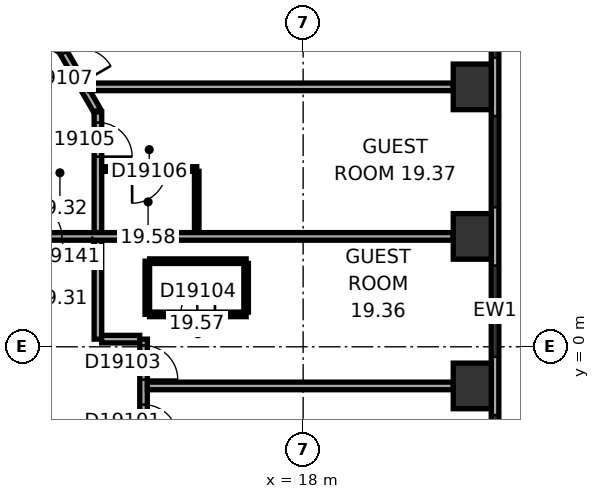
"""IFC4 building model, lengths in metres.
Left out: names, types, materials, properties, quantities, classifications, styles, units other than length and angle.
Written with IfcOpenShell. Run it as: python <this file> out.ifc"""

import sys

from ifc_helpers import new_model, si_unit, direction, frame, frame_2d, origin, origin_2d, place, context, subcontext, project, spatial, rectangle, extrude, element, fill, save


model = new_model("IFC4")
c1 = context("Model", 3, precision=1e-05, world=origin(), true_north=direction((0.0, 1.0)))
c2 = subcontext(c1, "Body", "Model", "MODEL_VIEW")
j1 = project(units=[si_unit("LENGTHUNIT", "METRE"), si_unit("PLANEANGLEUNIT", "RADIAN")], contexts=[c1])
p1 = place(None, origin())
s1 = spatial("IfcSite", under=j1, at=p1, CompositionType="ELEMENT")
p2 = place(p1, origin())
s2 = spatial("IfcBuilding", under=s1, at=p2, CompositionType="ELEMENT")
p3 = place(p2, frame((0.0, 0.0, 86.9)))
s3 = spatial("IfcBuildingStorey", under=s2, at=p3, CompositionType="ELEMENT", Elevation=86.9)
for number, where, z_axis, x_axis in (
    (1, (22.45, -1.03, 0.0), (0.0, 0.0, 1.0), (0.0, 1.0, 0.0)),
    (2, (22.45, 2.905, 0.0), (0.0, 0.0, 1.0), (0.0, 1.0, 0.0)),
    (3, (22.45, 6.839, 0.0), (0.0, 0.0, 1.0), (0.0, 1.0, 0.0)),
):
    element("IfcColumn", number, at=place(p3, frame(where, z_axis=z_axis, x_axis=x_axis)), inside=s3, PredefinedType="COLUMN", context=c2, shape_type="SweptSolid", body=[
        extrude(rectangle(XDim=1.2, YDim=1.0, at=origin_2d()), origin(), (0.0, 0.0, 1.0), 3.3),
    ])
p4 = place(p3, frame((23.05, -9.687, 0.0), z_axis=(0.0, 0.0, 1.0), x_axis=(0.0, 1.0, 0.0)))
e4 = element("IfcWall", 4, at=p4, inside=s3, PredefinedType="STANDARD", context=c2, shape_type="SweptSolid", body=[
    extrude(rectangle(XDim=21.246, YDim=0.2, at=frame_2d((10.623, 0.0))), origin(), (0.0, 0.0, 1.0), 3.3),
])
p5 = place(p4, frame((1.555, 0.0, 0.8)))
e5 = element("IfcOpeningElement", 5, at=p5, cuts=e4, PredefinedType="OPENING", context=c2, shape_type="SweptSolid", body=[
    extrude(rectangle(XDim=2.4, YDim=1.7, at=frame_2d((1.2, 0.85))), frame((0.0, 0.11, 0.0), z_axis=(0.0, -1.0, 0.0), x_axis=(1.0, 0.0, 0.0)), (0.0, 0.0, 1.0), 0.22),
])
p6 = place(p4, frame((5.489, 0.0, 0.8)))
e6 = element("IfcOpeningElement", 6, at=p6, cuts=e4, PredefinedType="OPENING", context=c2, shape_type="SweptSolid", body=[
    extrude(rectangle(XDim=2.4, YDim=1.7, at=frame_2d((1.2, 0.85))), frame((0.0, 0.11, 0.0), z_axis=(0.0, -1.0, 0.0), x_axis=(1.0, 0.0, 0.0)), (0.0, 0.0, 1.0), 0.22),
])
p7 = place(p4, frame((9.424, 0.0, 0.8)))
e7 = element("IfcOpeningElement", 7, at=p7, cuts=e4, PredefinedType="OPENING", context=c2, shape_type="SweptSolid", body=[
    extrude(rectangle(XDim=2.4, YDim=1.7, at=frame_2d((1.2, 0.85))), frame((0.0, 0.11, 0.0), z_axis=(0.0, -1.0, 0.0), x_axis=(1.0, 0.0, 0.0)), (0.0, 0.0, 1.0), 0.22),
])
p8 = place(p4, frame((13.358, 0.0, 0.8)))
e8 = element("IfcOpeningElement", 8, at=p8, cuts=e4, PredefinedType="OPENING", context=c2, shape_type="SweptSolid", body=[
    extrude(rectangle(XDim=2.4, YDim=1.7, at=frame_2d((1.2, 0.85))), frame((0.0, 0.11, 0.0), z_axis=(0.0, -1.0, 0.0), x_axis=(1.0, 0.0, 0.0)), (0.0, 0.0, 1.0), 0.22),
])
p9 = place(p4, frame((17.293, 0.0, 0.8)))
e9 = element("IfcOpeningElement", 9, at=p9, cuts=e4, PredefinedType="OPENING", context=c2, shape_type="SweptSolid", body=[
    extrude(rectangle(XDim=2.4, YDim=1.7, at=frame_2d((1.2, 0.85))), frame((0.0, 0.11, 0.0), z_axis=(0.0, -1.0, 0.0), x_axis=(1.0, 0.0, 0.0)), (0.0, 0.0, 1.0), 0.22),
])
p10 = place(p3, frame((12.58, 6.212, 0.0), z_axis=(0.0, 0.0, 1.0), x_axis=(-0.500063286585, 0.865988862174, 0.0)))
e10 = element("IfcWall", 10, at=p10, inside=s3, PredefinedType="PARTITIONING", context=c2, shape_type="SweptSolid", body=[
    extrude(rectangle(XDim=1.86, YDim=0.2, at=frame_2d((0.93, 0.0))), origin(), (0.0, 0.0, 1.0), 3.05),
])
p11 = place(p10, frame((0.842, 0.0, 0.0)))
e11 = element("IfcOpeningElement", 11, at=p11, cuts=e10, PredefinedType="OPENING", context=c2, shape_type="SweptSolid", body=[
    extrude(rectangle(XDim=0.9, YDim=2.1, at=frame_2d((0.45, 1.05))), frame((0.0, 0.11, 0.0), z_axis=(0.0, -1.0, 0.0), x_axis=(1.0, 0.0, 0.0)), (0.0, 0.0, 1.0), 0.22),
])
p12 = place(p3, frame((12.6, 0.201, 0.0), z_axis=(0.0, 0.0, 1.0), x_axis=(0.0, 1.0, 0.0)))
e12 = element("IfcWall", 12, at=p12, inside=s3, PredefinedType="PARTITIONING", context=c2, shape_type="SweptSolid", body=[
    extrude(rectangle(XDim=2.604, YDim=0.2, at=frame_2d((1.302, 0.0))), origin(), (0.0, 0.0, 1.0), 3.05),
])
p13 = place(p3, frame((12.6, 3.004, 0.0), z_axis=(0.0, 0.0, 1.0), x_axis=(0.0, 1.0, 0.0)))
e13 = element("IfcWall", 13, at=p13, inside=s3, PredefinedType="PARTITIONING", context=c2, shape_type="SweptSolid", body=[
    extrude(rectangle(XDim=3.173, YDim=0.2, at=frame_2d((1.586, 0.0))), origin(), (0.0, 0.0, 1.0), 3.05),
])
p14 = place(p13, frame((1.998, 0.0, 0.0)))
e14 = element("IfcOpeningElement", 14, at=p14, cuts=e13, PredefinedType="OPENING", context=c2, shape_type="SweptSolid", body=[
    extrude(rectangle(XDim=0.9, YDim=2.1, at=frame_2d((0.45, 1.05))), frame((0.0, 0.11, 0.0), z_axis=(0.0, -1.0, 0.0), x_axis=(1.0, 0.0, 0.0)), (0.0, 0.0, 1.0), 0.22),
])
p15 = place(p3, frame((12.7, 4.677, 0.0), z_axis=(0.0, 0.0, 1.0), x_axis=(1.0, 0.0, 0.0)))
e15 = element("IfcWall", 15, at=p15, inside=s3, PredefinedType="PARTITIONING", context=c2, shape_type="SweptSolid", body=[
    extrude(rectangle(XDim=2.5, YDim=0.12, at=frame_2d((1.25, 0.0))), origin(), (0.0, 0.0, 1.0), 3.05),
])
p16 = place(p15, frame((0.8, 0.0, 0.0)))
e16 = element("IfcOpeningElement", 16, at=p16, cuts=e15, PredefinedType="OPENING", context=c2, shape_type="SweptSolid", body=[
    extrude(rectangle(XDim=0.9, YDim=2.1, at=frame_2d((0.45, 1.05))), frame((0.0, 0.07, 0.0), z_axis=(0.0, -1.0, 0.0), x_axis=(1.0, 0.0, 0.0)), (0.0, 0.0, 1.0), 0.14),
])
p17 = place(p3, frame((13.701, 0.201, 0.0), z_axis=(0.0, 0.0, 1.0), x_axis=(-1.0, 0.0, 0.0)))
e17 = element("IfcWall", 17, at=p17, inside=s3, PredefinedType="PARTITIONING", context=c2, shape_type="SweptSolid", body=[
    extrude(rectangle(XDim=1.001, YDim=0.2, at=frame_2d((0.5, 0.0))), origin(), (0.0, 0.0, 1.0), 3.05),
])
p18 = place(p3, frame((13.801, -5.501, 0.0), z_axis=(0.0, 0.0, 1.0), x_axis=(0.0, 1.0, 0.0)))
e18 = element("IfcWall", 18, at=p18, inside=s3, PredefinedType="PARTITIONING", context=c2, shape_type="SweptSolid", body=[
    extrude(rectangle(XDim=5.702, YDim=0.2, at=frame_2d((2.851, 0.0))), origin(), (0.0, 0.0, 1.0), 3.05),
])
p19 = place(p18, frame((3.079, 0.0, 0.0)))
e19 = element("IfcOpeningElement", 19, at=p19, cuts=e18, PredefinedType="OPENING", context=c2, shape_type="SweptSolid", body=[
    extrude(rectangle(XDim=0.9, YDim=2.1, at=frame_2d((0.45, 1.05))), frame((0.0, 0.11, 0.0), z_axis=(0.0, -1.0, 0.0), x_axis=(1.0, 0.0, 0.0)), (0.0, 0.0, 1.0), 0.22),
])
p20 = place(p18, frame((4.636, 0.0, 0.0)))
e20 = element("IfcOpeningElement", 20, at=p20, cuts=e18, PredefinedType="OPENING", context=c2, shape_type="SweptSolid", body=[
    extrude(rectangle(XDim=0.9, YDim=2.1, at=frame_2d((0.45, 1.05))), frame((0.0, 0.11, 0.0), z_axis=(0.0, -1.0, 0.0), x_axis=(1.0, 0.0, 0.0)), (0.0, 0.0, 1.0), 0.22),
])
p21 = place(p3, frame((13.9, 0.853, 0.0), z_axis=(0.0, 0.0, 1.0), x_axis=(0.0, 1.0, 0.0)))
e21 = element("IfcWall", 21, at=p21, inside=s3, PredefinedType="PARTITIONING", context=c2, shape_type="SweptSolid", body=[
    extrude(rectangle(XDim=1.4, YDim=0.12, at=frame_2d((0.7, 0.0))), origin(), (0.0, 0.0, 1.0), 3.05),
])
p22 = place(p3, frame((13.96, 2.253, 0.0), z_axis=(0.0, 0.0, 1.0), x_axis=(1.0, 0.0, 0.0)))
e22 = element("IfcWall", 22, at=p22, inside=s3, PredefinedType="PARTITIONING", context=c2, shape_type="SweptSolid", body=[
    extrude(rectangle(XDim=2.54, YDim=0.12, at=frame_2d((1.27, 0.0))), origin(), (0.0, 0.0, 1.0), 3.05),
])
p23 = place(p3, frame((15.2, 4.618, 0.0), z_axis=(0.0, 0.0, 1.0), x_axis=(0.0, -1.0, 0.0)))
e23 = element("IfcWall", 23, at=p23, inside=s3, PredefinedType="PARTITIONING", context=c2, shape_type="SweptSolid", body=[
    extrude(rectangle(XDim=1.613, YDim=0.12, at=frame_2d((0.807, 0.0))), origin(), (0.0, 0.0, 1.0), 3.05),
])
p24 = place(p3, frame((16.5, 0.853, 0.0), z_axis=(0.0, 0.0, 1.0), x_axis=(-1.0, 0.0, 0.0)))
e24 = element("IfcWall", 24, at=p24, inside=s3, PredefinedType="PARTITIONING", context=c2, shape_type="SweptSolid", body=[
    extrude(rectangle(XDim=2.54, YDim=0.12, at=frame_2d((1.27, 0.0))), origin(), (0.0, 0.0, 1.0), 3.05),
])
p25 = place(p24, frame((0.82, 0.0, 0.0)))
e25 = element("IfcOpeningElement", 25, at=p25, cuts=e24, PredefinedType="OPENING", context=c2, shape_type="SweptSolid", body=[
    extrude(rectangle(XDim=0.9, YDim=2.1, at=frame_2d((0.45, 1.05))), frame((0.0, 0.07, 0.0), z_axis=(0.0, -1.0, 0.0), x_axis=(1.0, 0.0, 0.0)), (0.0, 0.0, 1.0), 0.14),
])
p26 = place(p3, frame((16.5, 2.193, 0.0), z_axis=(0.0, 0.0, 1.0), x_axis=(0.0, -1.0, 0.0)))
e26 = element("IfcWall", 26, at=p26, inside=s3, PredefinedType="PARTITIONING", context=c2, shape_type="SweptSolid", body=[
    extrude(rectangle(XDim=1.28, YDim=0.12, at=frame_2d((0.64, 0.0))), origin(), (0.0, 0.0, 1.0), 3.05),
])
p27 = place(p3, frame((21.95, -1.03, 0.0), z_axis=(0.0, 0.0, 1.0), x_axis=(-1.0, 0.0, 0.0)))
e27 = element("IfcWall", 27, at=p27, inside=s3, PredefinedType="PARTITIONING", context=c2, shape_type="SweptSolid", body=[
    extrude(rectangle(XDim=8.049, YDim=0.2, at=frame_2d((4.024, 0.0))), origin(), (0.0, 0.0, 1.0), 2.6),
])
p28 = place(p3, frame((21.95, 2.905, 0.0), z_axis=(0.0, 0.0, 1.0), x_axis=(-1.0, 0.0, 0.0)))
e28 = element("IfcWall", 28, at=p28, inside=s3, PredefinedType="PARTITIONING", context=c2, shape_type="SweptSolid", body=[
    extrude(rectangle(XDim=11.25, YDim=0.2, at=frame_2d((5.625, 0.0))), origin(), (0.0, 0.0, 1.0), 3.05),
])
p29 = place(p28, frame((9.5, 0.0, 0.0)))
e29 = element("IfcOpeningElement", 29, at=p29, cuts=e28, PredefinedType="OPENING", context=c2, shape_type="SweptSolid", body=[
    extrude(rectangle(XDim=1.6, YDim=2.1, at=frame_2d((0.8, 1.05))), frame((0.0, 0.11, 0.0), z_axis=(0.0, -1.0, 0.0), x_axis=(1.0, 0.0, 0.0)), (0.0, 0.0, 1.0), 0.22),
])
p30 = place(p3, frame((21.95, 6.839, 0.0), z_axis=(0.0, 0.0, 1.0), x_axis=(-1.0, 0.0, 0.0)))
e30 = element("IfcWall", 30, at=p30, inside=s3, PredefinedType="PARTITIONING", context=c2, shape_type="SweptSolid", body=[
    extrude(rectangle(XDim=9.572, YDim=0.2, at=frame_2d((4.786, 0.0))), origin(), (0.0, 0.0, 1.0), 3.05),
])
p31 = place(p6, origin())
e31 = element("IfcWindow", 31, at=p31, inside=s3, PartitioningType="SINGLE_PANEL", PredefinedType="WINDOW", context=c2, shape_type="SweptSolid", body=[
    extrude(rectangle(XDim=2.4, YDim=1.7, at=frame_2d((1.2, 0.85))), frame((0.0, 0.03, 0.0), z_axis=(0.0, -1.0, 0.0), x_axis=(1.0, 0.0, 0.0)), (0.0, 0.0, 1.0), 0.06),
])
fill(e6, e31)
p32 = place(p7, origin())
e32 = element("IfcWindow", 32, at=p32, inside=s3, PartitioningType="SINGLE_PANEL", PredefinedType="WINDOW", context=c2, shape_type="SweptSolid", body=[
    extrude(rectangle(XDim=2.4, YDim=1.7, at=frame_2d((1.2, 0.85))), frame((0.0, 0.03, 0.0), z_axis=(0.0, -1.0, 0.0), x_axis=(1.0, 0.0, 0.0)), (0.0, 0.0, 1.0), 0.06),
])
fill(e7, e32)
p33 = place(p8, origin())
e33 = element("IfcWindow", 33, at=p33, inside=s3, PartitioningType="SINGLE_PANEL", PredefinedType="WINDOW", context=c2, shape_type="SweptSolid", body=[
    extrude(rectangle(XDim=2.4, YDim=1.7, at=frame_2d((1.2, 0.85))), frame((0.0, 0.03, 0.0), z_axis=(0.0, -1.0, 0.0), x_axis=(1.0, 0.0, 0.0)), (0.0, 0.0, 1.0), 0.06),
])
fill(e8, e33)
p34 = place(p9, origin())
e34 = element("IfcWindow", 34, at=p34, inside=s3, PartitioningType="SINGLE_PANEL", PredefinedType="WINDOW", context=c2, shape_type="SweptSolid", body=[
    extrude(rectangle(XDim=2.4, YDim=1.7, at=frame_2d((1.2, 0.85))), frame((0.0, 0.03, 0.0), z_axis=(0.0, -1.0, 0.0), x_axis=(1.0, 0.0, 0.0)), (0.0, 0.0, 1.0), 0.06),
])
fill(e9, e34)
p35 = place(p19, origin())
e35 = element("IfcDoor", 35, at=p35, inside=s3, OperationType="SINGLE_SWING_LEFT", PredefinedType="DOOR", context=c2, shape_type="SweptSolid", body=[
    extrude(rectangle(XDim=0.9, YDim=2.1, at=frame_2d((0.45, 1.05))), frame((0.0, 0.025, 0.0), z_axis=(0.0, -1.0, 0.0), x_axis=(1.0, 0.0, 0.0)), (0.0, 0.0, 1.0), 0.05),
])
fill(e19, e35)
p36 = place(p20, origin())
e36 = element("IfcDoor", 36, at=p36, inside=s3, OperationType="SINGLE_SWING_LEFT", PredefinedType="DOOR", context=c2, shape_type="SweptSolid", body=[
    extrude(rectangle(XDim=0.9, YDim=2.1, at=frame_2d((0.45, 1.05))), frame((0.0, 0.025, 0.0), z_axis=(0.0, -1.0, 0.0), x_axis=(1.0, 0.0, 0.0)), (0.0, 0.0, 1.0), 0.05),
])
fill(e20, e36)
p37 = place(p25, origin())
e37 = element("IfcDoor", 37, at=p37, inside=s3, OperationType="SINGLE_SWING_LEFT", PredefinedType="DOOR", context=c2, shape_type="SweptSolid", body=[
    extrude(rectangle(XDim=0.9, YDim=2.1, at=frame_2d((0.45, 1.05))), frame((0.0, 0.025, 0.0), z_axis=(0.0, -1.0, 0.0), x_axis=(1.0, 0.0, 0.0)), (0.0, 0.0, 1.0), 0.05),
])
fill(e25, e37)
p38 = place(p14, origin())
e38 = element("IfcDoor", 38, at=p38, inside=s3, OperationType="SINGLE_SWING_LEFT", PredefinedType="DOOR", context=c2, shape_type="SweptSolid", body=[
    extrude(rectangle(XDim=0.9, YDim=2.1, at=frame_2d((0.45, 1.05))), frame((0.0, 0.025, 0.0), z_axis=(0.0, -1.0, 0.0), x_axis=(1.0, 0.0, 0.0)), (0.0, 0.0, 1.0), 0.05),
])
fill(e14, e38)
p39 = place(p16, origin())
e39 = element("IfcDoor", 39, at=p39, inside=s3, OperationType="SINGLE_SWING_LEFT", PredefinedType="DOOR", context=c2, shape_type="SweptSolid", body=[
    extrude(rectangle(XDim=0.9, YDim=2.1, at=frame_2d((0.45, 1.05))), frame((0.0, 0.025, 0.0), z_axis=(0.0, -1.0, 0.0), x_axis=(1.0, 0.0, 0.0)), (0.0, 0.0, 1.0), 0.05),
])
fill(e16, e39)
p40 = place(p11, origin())
e40 = element("IfcDoor", 40, at=p40, inside=s3, OperationType="SINGLE_SWING_LEFT", PredefinedType="DOOR", context=c2, shape_type="SweptSolid", body=[
    extrude(rectangle(XDim=0.9, YDim=2.1, at=frame_2d((0.45, 1.05))), frame((0.0, 0.025, 0.0), z_axis=(0.0, -1.0, 0.0), x_axis=(1.0, 0.0, 0.0)), (0.0, 0.0, 1.0), 0.05),
])
fill(e11, e40)
p41 = place(p29, origin())
e41 = element("IfcDoor", 41, at=p41, inside=s3, OperationType="DOUBLE_DOOR_SINGLE_SWING", PredefinedType="DOOR", context=c2, shape_type="SweptSolid", body=[
    extrude(rectangle(XDim=1.6, YDim=2.1, at=frame_2d((0.8, 1.05))), frame((0.0, 0.025, 0.0), z_axis=(0.0, -1.0, 0.0), x_axis=(1.0, 0.0, 0.0)), (0.0, 0.0, 1.0), 0.05),
])
fill(e29, e41)
save(model, sys.argv[1])
